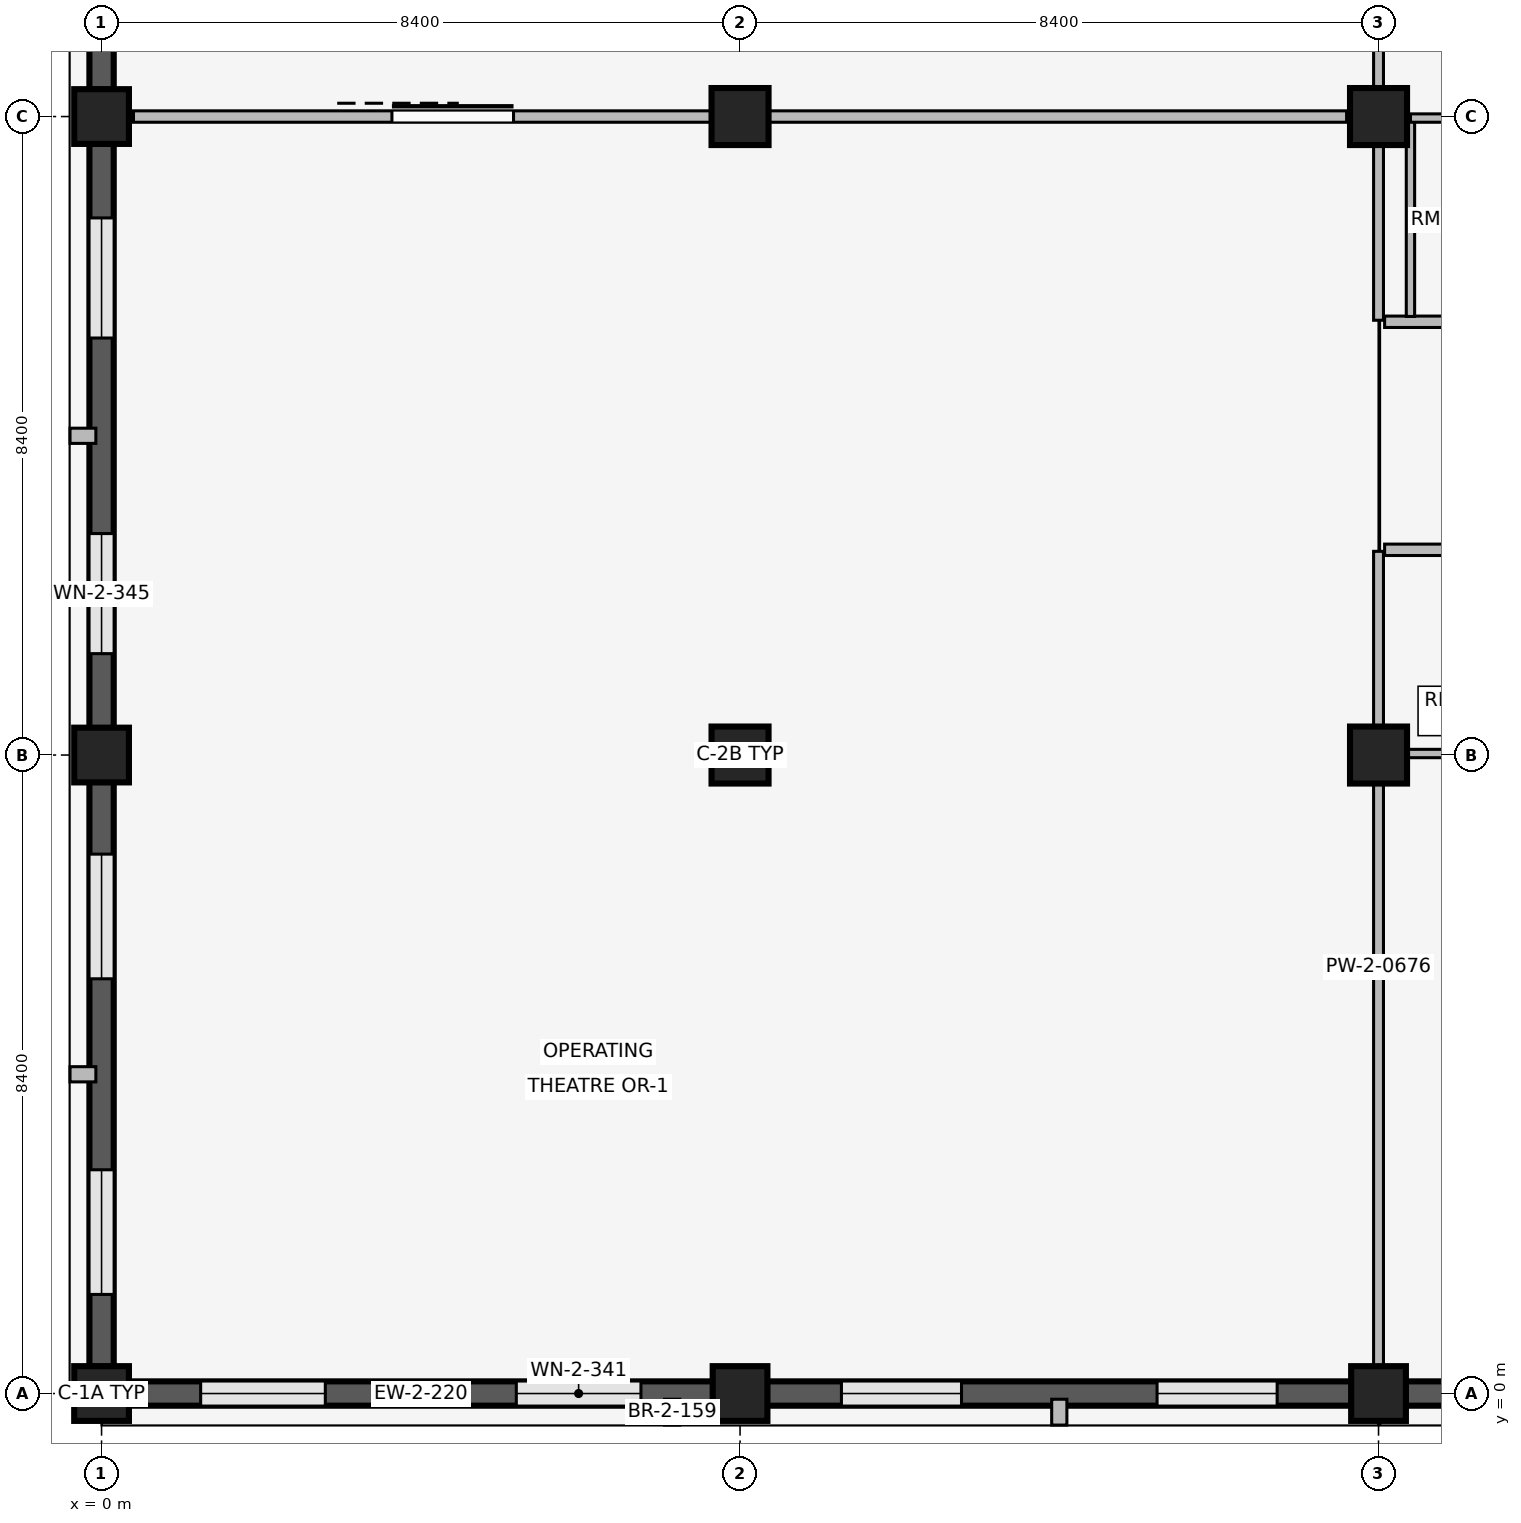
"""IFC4 building model, lengths in metres.
Left out: names, types, materials, properties, quantities, classifications, styles, units other than length and angle.
Written with IfcOpenShell. Run it as: python <this file> out.ifc"""

import sys

from ifc_helpers import new_model, si_unit, direction, frame, frame_2d, origin, origin_2d, place, context, subcontext, project, spatial, rectangle, extrude, element, fill, save


model = new_model("IFC4")
c1 = context("Model", 3, precision=1e-05, world=origin(), true_north=direction((0.0, 1.0)))
c2 = subcontext(c1, "Body", "Model", "MODEL_VIEW")
j1 = project(units=[si_unit("LENGTHUNIT", "METRE"), si_unit("PLANEANGLEUNIT", "RADIAN")], contexts=[c1])
p1 = place(None, origin())
s1 = spatial("IfcSite", under=j1, at=p1, CompositionType="ELEMENT")
p2 = place(p1, origin())
s2 = spatial("IfcBuilding", under=s1, at=p2, CompositionType="ELEMENT")
p3 = place(p2, frame((0.0, 0.0, 8.1)))
s3 = spatial("IfcBuildingStorey", under=s2, at=p3, CompositionType="ELEMENT", Elevation=8.1)
for number, where, z_axis, x_axis in (
    (1, (0.0, 0.0, 0.0), (0.0, 0.0, 1.0), (1.0, 0.0, 0.0)),
    (2, (0.0, 8.4, 0.0), (0.0, 0.0, 1.0), (1.0, 0.0, 0.0)),
    (3, (0.0, 16.8, 0.0), (0.0, 0.0, 1.0), (1.0, 0.0, 0.0)),
    (4, (8.4, 0.0, 0.0), (0.0, 0.0, 1.0), (1.0, 0.0, 0.0)),
):
    element("IfcColumn", number, at=place(p3, frame(where, z_axis=z_axis, x_axis=x_axis)), inside=s3, PredefinedType="COLUMN", context=c2, shape_type="SweptSolid", body=[
        extrude(rectangle(XDim=0.72, YDim=0.72, at=origin_2d()), origin(), (0.0, 0.0, 1.0), 4.8),
    ])
for number, where, z_axis, x_axis in (
    (5, (8.4, 8.4, 0.0), (0.0, 0.0, 1.0), (1.0, 0.0, 0.0)),
    (6, (8.4, 16.8, 0.0), (0.0, 0.0, 1.0), (1.0, 0.0, 0.0)),
):
    element("IfcColumn", number, at=place(p3, frame(where, z_axis=z_axis, x_axis=x_axis)), inside=s3, PredefinedType="COLUMN", context=c2, shape_type="SweptSolid", body=[
        extrude(rectangle(XDim=0.75, YDim=0.75, at=origin_2d()), origin(), (0.0, 0.0, 1.0), 4.8),
    ])
p4 = place(p3, frame((16.8, 0.0, 0.0), z_axis=(0.0, 0.0, 1.0), x_axis=(1.0, 0.0, 0.0)))
e7 = element("IfcColumn", 7, at=p4, inside=s3, PredefinedType="COLUMN", context=c2, shape_type="SweptSolid", body=[
    extrude(rectangle(XDim=0.72, YDim=0.72, at=origin_2d()), origin(), (0.0, 0.0, 1.0), 4.8),
])
for number, where, z_axis, x_axis in (
    (8, (16.8, 8.4, 0.0), (0.0, 0.0, 1.0), (1.0, 0.0, 0.0)),
    (9, (16.8, 16.8, 0.0), (0.0, 0.0, 1.0), (1.0, 0.0, 0.0)),
):
    element("IfcColumn", number, at=place(p3, frame(where, z_axis=z_axis, x_axis=x_axis)), inside=s3, PredefinedType="COLUMN", context=c2, shape_type="SweptSolid", body=[
        extrude(rectangle(XDim=0.75, YDim=0.75, at=origin_2d()), origin(), (0.0, 0.0, 1.0), 4.8),
    ])
p5 = place(p3, frame((8.045, 0.0, 0.0), z_axis=(0.0, 0.0, 1.0), x_axis=(-1.0, 0.0, 0.0)))
e10 = element("IfcWall", 10, at=p5, inside=s3, PredefinedType="SOLIDWALL", context=c2, shape_type="SweptSolid", body=[
    extrude(rectangle(XDim=7.69, YDim=0.32, at=frame_2d((3.845, 0.0))), origin(), (0.0, 0.0, 1.0), 3.86),
])
p6 = place(p5, frame((0.949, 0.0, 0.85)))
e11 = element("IfcOpeningElement", 11, at=p6, cuts=e10, PredefinedType="OPENING", context=c2, shape_type="SweptSolid", body=[
    extrude(rectangle(XDim=1.64, YDim=1.75, at=frame_2d((0.82, 0.875))), frame((0.0, 0.17, 0.0), z_axis=(0.0, -1.0, 0.0), x_axis=(1.0, 0.0, 0.0)), (0.0, 0.0, 1.0), 0.34),
])
p7 = place(p5, frame((5.101, 0.0, 0.85)))
e12 = element("IfcOpeningElement", 12, at=p7, cuts=e10, PredefinedType="OPENING", context=c2, shape_type="SweptSolid", body=[
    extrude(rectangle(XDim=1.64, YDim=1.75, at=frame_2d((0.82, 0.875))), frame((0.0, 0.17, 0.0), z_axis=(0.0, -1.0, 0.0), x_axis=(1.0, 0.0, 0.0)), (0.0, 0.0, 1.0), 0.34),
])
p8 = place(p3, frame((7.507, -0.075, 0.0), z_axis=(0.0, 0.0, 1.0), x_axis=(0.0, -1.0, 0.0)))
e13 = element("IfcWall", 13, at=p8, inside=s3, PredefinedType="ELEMENTEDWALL", context=c2, shape_type="SweptSolid", body=[
    extrude(rectangle(XDim=0.34, YDim=0.2, at=frame_2d((0.17, 0.0))), origin(), (0.0, 0.0, 1.0), 3.84),
])
p9 = place(p3, frame((0.0, 0.355, 0.0), z_axis=(0.0, 0.0, 1.0), x_axis=(0.0, 1.0, 0.0)))
e14 = element("IfcWall", 14, at=p9, inside=s3, PredefinedType="SOLIDWALL", context=c2, shape_type="SweptSolid", body=[
    extrude(rectangle(XDim=7.69, YDim=0.32, at=frame_2d((3.845, 0.0))), origin(), (0.0, 0.0, 1.0), 3.86),
])
p10 = place(p9, frame((0.949, 0.0, 0.85)))
e15 = element("IfcOpeningElement", 15, at=p10, cuts=e14, PredefinedType="OPENING", context=c2, shape_type="SweptSolid", body=[
    extrude(rectangle(XDim=1.64, YDim=1.75, at=frame_2d((0.82, 0.875))), frame((0.0, 0.17, 0.0), z_axis=(0.0, -1.0, 0.0), x_axis=(1.0, 0.0, 0.0)), (0.0, 0.0, 1.0), 0.34),
])
p11 = place(p9, frame((5.101, 0.0, 0.85)))
e16 = element("IfcOpeningElement", 16, at=p11, cuts=e14, PredefinedType="OPENING", context=c2, shape_type="SweptSolid", body=[
    extrude(rectangle(XDim=1.64, YDim=1.75, at=frame_2d((0.82, 0.875))), frame((0.0, 0.17, 0.0), z_axis=(0.0, -1.0, 0.0), x_axis=(1.0, 0.0, 0.0)), (0.0, 0.0, 1.0), 0.34),
])
p12 = place(p3, frame((-0.075, 4.2, 0.0), z_axis=(0.0, 0.0, 1.0), x_axis=(-1.0, 0.0, 0.0)))
e17 = element("IfcWall", 17, at=p12, inside=s3, PredefinedType="ELEMENTEDWALL", context=c2, shape_type="SweptSolid", body=[
    extrude(rectangle(XDim=0.34, YDim=0.2, at=frame_2d((0.17, 0.0))), origin(), (0.0, 0.0, 1.0), 3.84),
])
p13 = place(p3, frame((0.0, 8.755, 0.0), z_axis=(0.0, 0.0, 1.0), x_axis=(0.0, 1.0, 0.0)))
e18 = element("IfcWall", 18, at=p13, inside=s3, PredefinedType="SOLIDWALL", context=c2, shape_type="SweptSolid", body=[
    extrude(rectangle(XDim=7.69, YDim=0.32, at=frame_2d((3.845, 0.0))), origin(), (0.0, 0.0, 1.0), 3.86),
])
p14 = place(p13, frame((0.979, 0.0, 0.85)))
e19 = element("IfcOpeningElement", 19, at=p14, cuts=e18, PredefinedType="OPENING", context=c2, shape_type="SweptSolid", body=[
    extrude(rectangle(XDim=1.58, YDim=1.7, at=frame_2d((0.79, 0.85))), frame((0.0, 0.17, 0.0), z_axis=(0.0, -1.0, 0.0), x_axis=(1.0, 0.0, 0.0)), (0.0, 0.0, 1.0), 0.34),
])
p15 = place(p13, frame((5.131, 0.0, 0.85)))
e20 = element("IfcOpeningElement", 20, at=p15, cuts=e18, PredefinedType="OPENING", context=c2, shape_type="SweptSolid", body=[
    extrude(rectangle(XDim=1.58, YDim=1.7, at=frame_2d((0.79, 0.85))), frame((0.0, 0.17, 0.0), z_axis=(0.0, -1.0, 0.0), x_axis=(1.0, 0.0, 0.0)), (0.0, 0.0, 1.0), 0.34),
])
p16 = place(p3, frame((-0.075, 12.6, 0.0), z_axis=(0.0, 0.0, 1.0), x_axis=(-1.0, 0.0, 0.0)))
e21 = element("IfcWall", 21, at=p16, inside=s3, PredefinedType="ELEMENTEDWALL", context=c2, shape_type="SweptSolid", body=[
    extrude(rectangle(XDim=0.34, YDim=0.2, at=frame_2d((0.17, 0.0))), origin(), (0.0, 0.0, 1.0), 3.84),
])
p17 = place(p3, frame((0.0, 17.155, 0.0), z_axis=(0.0, 0.0, 1.0), x_axis=(0.0, 1.0, 0.0)))
e22 = element("IfcWall", 22, at=p17, inside=s3, PredefinedType="SOLIDWALL", context=c2, shape_type="SweptSolid", body=[
    extrude(rectangle(XDim=7.69, YDim=0.32, at=frame_2d((3.845, 0.0))), origin(), (0.0, 0.0, 1.0), 3.86),
])
p18 = place(p17, frame((1.029, 0.0, 0.85)))
e23 = element("IfcOpeningElement", 23, at=p18, cuts=e22, PredefinedType="OPENING", context=c2, shape_type="SweptSolid", body=[
    extrude(rectangle(XDim=1.48, YDim=1.6, at=frame_2d((0.74, 0.8))), frame((0.0, 0.17, 0.0), z_axis=(0.0, -1.0, 0.0), x_axis=(1.0, 0.0, 0.0)), (0.0, 0.0, 1.0), 0.34),
])
p19 = place(p17, frame((5.181, 0.0, 0.85)))
e24 = element("IfcOpeningElement", 24, at=p19, cuts=e22, PredefinedType="OPENING", context=c2, shape_type="SweptSolid", body=[
    extrude(rectangle(XDim=1.48, YDim=1.6, at=frame_2d((0.74, 0.8))), frame((0.0, 0.17, 0.0), z_axis=(0.0, -1.0, 0.0), x_axis=(1.0, 0.0, 0.0)), (0.0, 0.0, 1.0), 0.34),
])
p20 = place(p3, frame((16.445, 0.0, 0.0), z_axis=(0.0, 0.0, 1.0), x_axis=(-1.0, 0.0, 0.0)))
e25 = element("IfcWall", 25, at=p20, inside=s3, PredefinedType="SOLIDWALL", context=c2, shape_type="SweptSolid", body=[
    extrude(rectangle(XDim=7.69, YDim=0.32, at=frame_2d((3.845, 0.0))), origin(), (0.0, 0.0, 1.0), 3.86),
])
p21 = place(p20, frame((0.979, 0.0, 0.85)))
e26 = element("IfcOpeningElement", 26, at=p21, cuts=e25, PredefinedType="OPENING", context=c2, shape_type="SweptSolid", body=[
    extrude(rectangle(XDim=1.58, YDim=1.7, at=frame_2d((0.79, 0.85))), frame((0.0, 0.17, 0.0), z_axis=(0.0, -1.0, 0.0), x_axis=(1.0, 0.0, 0.0)), (0.0, 0.0, 1.0), 0.34),
])
p22 = place(p20, frame((5.131, 0.0, 0.85)))
e27 = element("IfcOpeningElement", 27, at=p22, cuts=e25, PredefinedType="OPENING", context=c2, shape_type="SweptSolid", body=[
    extrude(rectangle(XDim=1.58, YDim=1.7, at=frame_2d((0.79, 0.85))), frame((0.0, 0.17, 0.0), z_axis=(0.0, -1.0, 0.0), x_axis=(1.0, 0.0, 0.0)), (0.0, 0.0, 1.0), 0.34),
])
p23 = place(p3, frame((12.6, -0.075, 0.0), z_axis=(0.0, 0.0, 1.0), x_axis=(0.0, -1.0, 0.0)))
e28 = element("IfcWall", 28, at=p23, inside=s3, PredefinedType="ELEMENTEDWALL", context=c2, shape_type="SweptSolid", body=[
    extrude(rectangle(XDim=0.34, YDim=0.2, at=frame_2d((0.17, 0.0))), origin(), (0.0, 0.0, 1.0), 3.84),
])
p24 = place(p3, frame((24.845, 0.0, 0.0), z_axis=(0.0, 0.0, 1.0), x_axis=(-1.0, 0.0, 0.0)))
e29 = element("IfcWall", 29, at=p24, inside=s3, PredefinedType="SOLIDWALL", context=c2, shape_type="SweptSolid", body=[
    extrude(rectangle(XDim=7.69, YDim=0.32, at=frame_2d((3.845, 0.0))), origin(), (0.0, 0.0, 1.0), 3.86),
])
p25 = place(p24, frame((1.029, 0.0, 0.85)))
e30 = element("IfcOpeningElement", 30, at=p25, cuts=e29, PredefinedType="OPENING", context=c2, shape_type="SweptSolid", body=[
    extrude(rectangle(XDim=1.48, YDim=1.6, at=frame_2d((0.74, 0.8))), frame((0.0, 0.17, 0.0), z_axis=(0.0, -1.0, 0.0), x_axis=(1.0, 0.0, 0.0)), (0.0, 0.0, 1.0), 0.34),
])
p26 = place(p24, frame((5.181, 0.0, 0.85)))
e31 = element("IfcOpeningElement", 31, at=p26, cuts=e29, PredefinedType="OPENING", context=c2, shape_type="SweptSolid", body=[
    extrude(rectangle(XDim=1.48, YDim=1.6, at=frame_2d((0.74, 0.8))), frame((0.0, 0.17, 0.0), z_axis=(0.0, -1.0, 0.0), x_axis=(1.0, 0.0, 0.0)), (0.0, 0.0, 1.0), 0.34),
])
p27 = place(p3, frame((16.8, 0.14, 0.0), z_axis=(0.0, 0.0, 1.0), x_axis=(0.0, 1.0, 0.0)))
e32 = element("IfcWall", 32, at=p27, inside=s3, PredefinedType="PARTITIONING", context=c2, shape_type="SweptSolid", body=[
    extrude(rectangle(XDim=10.94, YDim=0.13, at=frame_2d((5.47, 0.0))), origin(), (0.0, 0.0, 1.0), 3.84),
])
p28 = place(p3, frame((16.8, 14.12, 0.0), z_axis=(0.0, 0.0, 1.0), x_axis=(0.0, 1.0, 0.0)))
e33 = element("IfcWall", 33, at=p28, inside=s3, PredefinedType="PARTITIONING", context=c2, shape_type="SweptSolid", body=[
    extrude(rectangle(XDim=10.94, YDim=0.13, at=frame_2d((5.47, 0.0))), origin(), (0.0, 0.0, 1.0), 3.84),
])
p29 = place(p3, frame((16.88, 11.1, 0.0), z_axis=(0.0, 0.0, 1.0), x_axis=(1.0, 0.0, 0.0)))
e34 = element("IfcWall", 34, at=p29, inside=s3, PredefinedType="PARTITIONING", context=c2, shape_type="SweptSolid", body=[
    extrude(rectangle(XDim=8.24, YDim=0.15, at=frame_2d((4.12, 0.0))), origin(), (0.0, 0.0, 1.0), 3.84),
])
p30 = place(p29, frame((0.98, 0.0, 0.0)))
e35 = element("IfcOpeningElement", 35, at=p30, cuts=e34, PredefinedType="OPENING", context=c2, shape_type="SweptSolid", body=[
    extrude(rectangle(XDim=0.95, YDim=2.15, at=frame_2d((0.475, 1.075))), frame((0.0, 0.085, 0.0), z_axis=(0.0, -1.0, 0.0), x_axis=(1.0, 0.0, 0.0)), (0.0, 0.0, 1.0), 0.17),
])
p31 = place(p29, frame((3.33, 0.0, 0.0)))
e36 = element("IfcOpeningElement", 36, at=p31, cuts=e34, PredefinedType="OPENING", context=c2, shape_type="SweptSolid", body=[
    extrude(rectangle(XDim=0.92, YDim=2.1, at=frame_2d((0.46, 1.05))), frame((0.0, 0.085, 0.0), z_axis=(0.0, -1.0, 0.0), x_axis=(1.0, 0.0, 0.0)), (0.0, 0.0, 1.0), 0.17),
])
p32 = place(p29, frame((5.73, 0.0, 0.0)))
e37 = element("IfcOpeningElement", 37, at=p32, cuts=e34, PredefinedType="OPENING", context=c2, shape_type="SweptSolid", body=[
    extrude(rectangle(XDim=0.92, YDim=2.1, at=frame_2d((0.46, 1.05))), frame((0.0, 0.085, 0.0), z_axis=(0.0, -1.0, 0.0), x_axis=(1.0, 0.0, 0.0)), (0.0, 0.0, 1.0), 0.17),
])
p33 = place(p3, frame((16.88, 8.42, 0.0), z_axis=(0.0, 0.0, 1.0), x_axis=(1.0, 0.0, 0.0)))
e38 = element("IfcWall", 38, at=p33, inside=s3, PredefinedType="PARTITIONING", context=c2, shape_type="SweptSolid", body=[
    extrude(rectangle(XDim=8.24, YDim=0.11, at=frame_2d((4.12, 0.0))), origin(), (0.0, 0.0, 1.0), 3.84),
])
p34 = place(p33, frame((6.38, 0.0, 0.0)))
e39 = element("IfcOpeningElement", 39, at=p34, cuts=e38, PredefinedType="OPENING", context=c2, shape_type="SweptSolid", body=[
    extrude(rectangle(XDim=1.05, YDim=2.2, at=frame_2d((0.525, 1.1))), frame((0.0, 0.065, 0.0), z_axis=(0.0, -1.0, 0.0), x_axis=(1.0, 0.0, 0.0)), (0.0, 0.0, 1.0), 0.13),
])
p35 = place(p3, frame((25.12, 14.1, 0.0), z_axis=(0.0, 0.0, 1.0), x_axis=(-1.0, 0.0, 0.0)))
e40 = element("IfcWall", 40, at=p35, inside=s3, PredefinedType="PARTITIONING", context=c2, shape_type="SweptSolid", body=[
    extrude(rectangle(XDim=8.24, YDim=0.15, at=frame_2d((4.12, 0.0))), origin(), (0.0, 0.0, 1.0), 3.84),
])
p36 = place(p35, frame((0.73, 0.0, 0.0)))
e41 = element("IfcOpeningElement", 41, at=p36, cuts=e40, PredefinedType="OPENING", context=c2, shape_type="SweptSolid", body=[
    extrude(rectangle(XDim=1.3, YDim=2.25, at=frame_2d((0.65, 1.125))), frame((0.0, 0.085, 0.0), z_axis=(0.0, -1.0, 0.0), x_axis=(1.0, 0.0, 0.0)), (0.0, 0.0, 1.0), 0.17),
])
p37 = place(p35, frame((4.43, 0.0, 0.0)))
e42 = element("IfcOpeningElement", 42, at=p37, cuts=e40, PredefinedType="OPENING", context=c2, shape_type="SweptSolid", body=[
    extrude(rectangle(XDim=1.3, YDim=2.25, at=frame_2d((0.65, 1.125))), frame((0.0, 0.085, 0.0), z_axis=(0.0, -1.0, 0.0), x_axis=(1.0, 0.0, 0.0)), (0.0, 0.0, 1.0), 0.17),
])
p38 = place(p3, frame((17.22, 14.17, 0.0), z_axis=(0.0, 0.0, 1.0), x_axis=(0.0, 1.0, 0.0)))
e43 = element("IfcWall", 43, at=p38, inside=s3, PredefinedType="PARTITIONING", context=c2, shape_type="SweptSolid", body=[
    extrude(rectangle(XDim=2.61, YDim=0.11, at=frame_2d((1.305, 0.0))), origin(), (0.0, 0.0, 1.0), 3.84),
])
p39 = place(p3, frame((17.22, 16.78, 0.0), z_axis=(0.0, 0.0, 1.0), x_axis=(1.0, 0.0, 0.0)))
e44 = element("IfcWall", 44, at=p39, inside=s3, PredefinedType="PARTITIONING", context=c2, shape_type="SweptSolid", body=[
    extrude(rectangle(XDim=1.98, YDim=0.11, at=frame_2d((0.99, 0.0))), origin(), (0.0, 0.0, 1.0), 3.84),
])
p40 = place(p39, frame((0.54, 0.0, 0.0)))
e45 = element("IfcOpeningElement", 45, at=p40, cuts=e44, PredefinedType="OPENING", context=c2, shape_type="SweptSolid", body=[
    extrude(rectangle(XDim=0.9, YDim=2.1, at=frame_2d((0.45, 1.05))), frame((0.0, 0.065, 0.0), z_axis=(0.0, -1.0, 0.0), x_axis=(1.0, 0.0, 0.0)), (0.0, 0.0, 1.0), 0.13),
])
p41 = place(p3, frame((0.42, 16.8, 0.0), z_axis=(0.0, 0.0, 1.0), x_axis=(1.0, 0.0, 0.0)))
e46 = element("IfcWall", 46, at=p41, inside=s3, PredefinedType="PARTITIONING", context=c2, shape_type="SweptSolid", body=[
    extrude(rectangle(XDim=15.96, YDim=0.15, at=frame_2d((7.98, 0.0))), origin(), (0.0, 0.0, 1.0), 3.84),
])
p42 = place(p41, frame((3.4, 0.0, 0.0)))
e47 = element("IfcOpeningElement", 47, at=p42, cuts=e46, PredefinedType="OPENING", context=c2, shape_type="SweptSolid", body=[
    extrude(rectangle(XDim=1.6, YDim=2.35, at=frame_2d((0.8, 1.175))), frame((0.0, 0.085, 0.0), z_axis=(0.0, -1.0, 0.0), x_axis=(1.0, 0.0, 0.0)), (0.0, 0.0, 1.0), 0.17),
])
p43 = place(p6, origin())
e48 = element("IfcWindow", 48, at=p43, inside=s3, PartitioningType="SINGLE_PANEL", PredefinedType="WINDOW", context=c2, shape_type="SweptSolid", body=[
    extrude(rectangle(XDim=1.64, YDim=1.75, at=frame_2d((0.82, 0.875))), frame((0.0, 0.03, 0.0), z_axis=(0.0, -1.0, 0.0), x_axis=(1.0, 0.0, 0.0)), (0.0, 0.0, 1.0), 0.06),
])
fill(e11, e48)
p44 = place(p7, origin())
e49 = element("IfcWindow", 49, at=p44, inside=s3, PartitioningType="SINGLE_PANEL", PredefinedType="WINDOW", context=c2, shape_type="SweptSolid", body=[
    extrude(rectangle(XDim=1.64, YDim=1.75, at=frame_2d((0.82, 0.875))), frame((0.0, 0.03, 0.0), z_axis=(0.0, -1.0, 0.0), x_axis=(1.0, 0.0, 0.0)), (0.0, 0.0, 1.0), 0.06),
])
fill(e12, e49)
p45 = place(p10, origin())
e50 = element("IfcWindow", 50, at=p45, inside=s3, PartitioningType="SINGLE_PANEL", PredefinedType="WINDOW", context=c2, shape_type="SweptSolid", body=[
    extrude(rectangle(XDim=1.64, YDim=1.75, at=frame_2d((0.82, 0.875))), frame((0.0, 0.03, 0.0), z_axis=(0.0, -1.0, 0.0), x_axis=(1.0, 0.0, 0.0)), (0.0, 0.0, 1.0), 0.06),
])
fill(e15, e50)
p46 = place(p11, origin())
e51 = element("IfcWindow", 51, at=p46, inside=s3, PartitioningType="SINGLE_PANEL", PredefinedType="WINDOW", context=c2, shape_type="SweptSolid", body=[
    extrude(rectangle(XDim=1.64, YDim=1.75, at=frame_2d((0.82, 0.875))), frame((0.0, 0.03, 0.0), z_axis=(0.0, -1.0, 0.0), x_axis=(1.0, 0.0, 0.0)), (0.0, 0.0, 1.0), 0.06),
])
fill(e16, e51)
p47 = place(p14, origin())
e52 = element("IfcWindow", 52, at=p47, inside=s3, PartitioningType="SINGLE_PANEL", PredefinedType="WINDOW", context=c2, shape_type="SweptSolid", body=[
    extrude(rectangle(XDim=1.58, YDim=1.7, at=frame_2d((0.79, 0.85))), frame((0.0, 0.03, 0.0), z_axis=(0.0, -1.0, 0.0), x_axis=(1.0, 0.0, 0.0)), (0.0, 0.0, 1.0), 0.06),
])
fill(e19, e52)
p48 = place(p15, origin())
e53 = element("IfcWindow", 53, at=p48, inside=s3, PartitioningType="SINGLE_PANEL", PredefinedType="WINDOW", context=c2, shape_type="SweptSolid", body=[
    extrude(rectangle(XDim=1.58, YDim=1.7, at=frame_2d((0.79, 0.85))), frame((0.0, 0.03, 0.0), z_axis=(0.0, -1.0, 0.0), x_axis=(1.0, 0.0, 0.0)), (0.0, 0.0, 1.0), 0.06),
])
fill(e20, e53)
p49 = place(p21, origin())
e54 = element("IfcWindow", 54, at=p49, inside=s3, PartitioningType="SINGLE_PANEL", PredefinedType="WINDOW", context=c2, shape_type="SweptSolid", body=[
    extrude(rectangle(XDim=1.58, YDim=1.7, at=frame_2d((0.79, 0.85))), frame((0.0, 0.03, 0.0), z_axis=(0.0, -1.0, 0.0), x_axis=(1.0, 0.0, 0.0)), (0.0, 0.0, 1.0), 0.06),
])
fill(e26, e54)
p50 = place(p22, origin())
e55 = element("IfcWindow", 55, at=p50, inside=s3, PartitioningType="SINGLE_PANEL", PredefinedType="WINDOW", context=c2, shape_type="SweptSolid", body=[
    extrude(rectangle(XDim=1.58, YDim=1.7, at=frame_2d((0.79, 0.85))), frame((0.0, 0.03, 0.0), z_axis=(0.0, -1.0, 0.0), x_axis=(1.0, 0.0, 0.0)), (0.0, 0.0, 1.0), 0.06),
])
fill(e27, e55)
p51 = place(p42, origin())
e56 = element("IfcDoor", 56, at=p51, inside=s3, OperationType="SLIDING_TO_LEFT", PredefinedType="DOOR", context=c2, shape_type="SweptSolid", body=[
    extrude(rectangle(XDim=1.6, YDim=2.35, at=frame_2d((0.8, 1.175))), frame((0.0, 0.025, 0.0), z_axis=(0.0, -1.0, 0.0), x_axis=(1.0, 0.0, 0.0)), (0.0, 0.0, 1.0), 0.05),
])
fill(e47, e56)
save(model, sys.argv[1])
